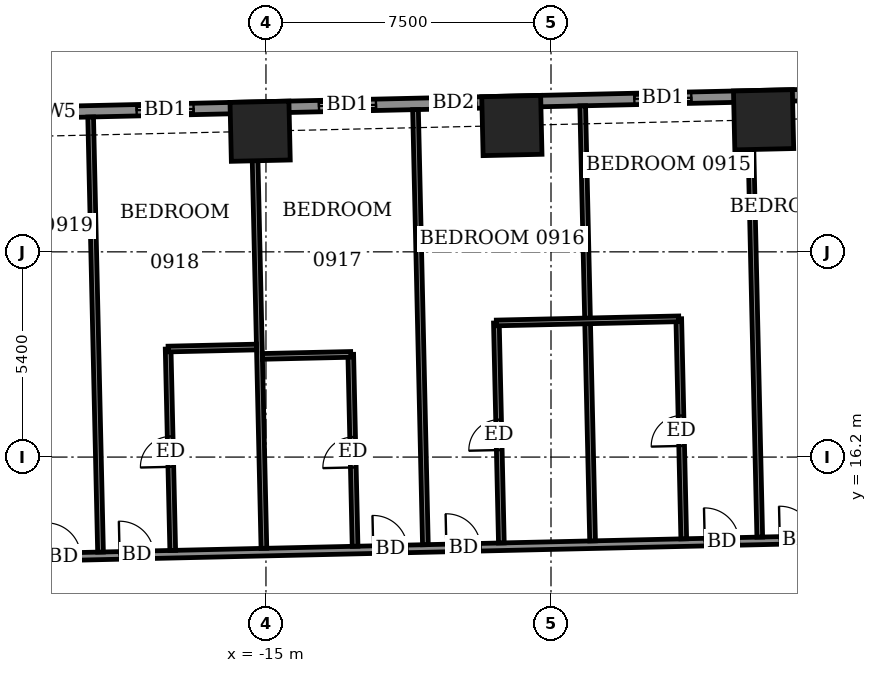
"""IFC4 building model, lengths in metres.
Left out: names, types, materials, properties, quantities, classifications, styles, units other than length and angle.
Written with IfcOpenShell. Run it as: python <this file> out.ifc"""

import sys

from ifc_helpers import new_model, si_unit, direction, frame, frame_2d, origin, origin_2d, place, context, subcontext, project, spatial, rectangle, extrude, element, fill, save


model = new_model("IFC4")
c1 = context("Model", 3, precision=1e-05, world=origin(), true_north=direction((0.0, 1.0)))
c2 = subcontext(c1, "Body", "Model", "MODEL_VIEW")
j1 = project(units=[si_unit("LENGTHUNIT", "METRE"), si_unit("PLANEANGLEUNIT", "RADIAN")], contexts=[c1])
p1 = place(None, origin())
s1 = spatial("IfcSite", under=j1, at=p1, CompositionType="ELEMENT")
p2 = place(p1, origin())
s2 = spatial("IfcBuilding", under=s1, at=p2, CompositionType="ELEMENT")
p3 = place(p2, frame((0.0, 0.0, 41.3)))
s3 = spatial("IfcBuildingStorey", under=s2, at=p3, CompositionType="ELEMENT", Elevation=41.3)
for number, where, z_axis, x_axis in (
    (1, (-1.906, 25.075, -0.55), (0.0, 0.0, 1.0), (-1.0, -0.023, 0.0)),
    (2, (-8.529, 24.924, -0.55), (0.0, 0.0, 1.0), (-1.0, -0.023, 0.0)),
    (3, (-15.154, 24.774, -0.55), (0.0, 0.0, 1.0), (-1.0, -0.023, 0.0)),
):
    element("IfcColumn", number, at=place(p3, frame(where, z_axis=z_axis, x_axis=x_axis)), inside=s3, PredefinedType="COLUMN", context=c2, shape_type="SweptSolid", body=[
        extrude(rectangle(XDim=1.55, YDim=1.55, at=origin_2d()), origin(), (0.0, 0.0, 1.0), 3.6),
    ])
p4 = place(p3, frame((24.423, 26.298, 0.0), z_axis=(0.0, 0.0, 1.0), x_axis=(-0.999742433108, -0.022695097355, 0.0)))
e4 = element("IfcWall", 4, at=p4, inside=s3, PredefinedType="SOLIDWALL", context=c2, shape_type="SweptSolid", body=[
    extrude(rectangle(XDim=52.701, YDim=0.3, at=frame_2d((26.35, 0.0))), origin(), (0.0, 0.0, 1.0), 3.05),
])
p5 = place(p4, frame((2.357, 0.0, 0.0)))
e5 = element("IfcOpeningElement", 5, at=p5, cuts=e4, PredefinedType="OPENING", context=c2, shape_type="SweptSolid", body=[
    extrude(rectangle(XDim=1.5, YDim=2.4, at=frame_2d((0.75, 1.2))), frame((0.0, 0.16, 0.0), z_axis=(0.0, -1.0, 0.0), x_axis=(1.0, 0.0, 0.0)), (0.0, 0.0, 1.0), 0.32),
])
p6 = place(p4, frame((7.475, 0.0, 0.0)))
e6 = element("IfcOpeningElement", 6, at=p6, cuts=e4, PredefinedType="OPENING", context=c2, shape_type="SweptSolid", body=[
    extrude(rectangle(XDim=1.5, YDim=2.4, at=frame_2d((0.75, 1.2))), frame((0.0, 0.16, 0.0), z_axis=(0.0, -1.0, 0.0), x_axis=(1.0, 0.0, 0.0)), (0.0, 0.0, 1.0), 0.32),
])
p7 = place(p4, frame((10.262, 0.0, 0.0)))
e7 = element("IfcOpeningElement", 7, at=p7, cuts=e4, PredefinedType="OPENING", context=c2, shape_type="SweptSolid", body=[
    extrude(rectangle(XDim=1.5, YDim=2.4, at=frame_2d((0.75, 1.2))), frame((0.0, 0.16, 0.0), z_axis=(0.0, -1.0, 0.0), x_axis=(1.0, 0.0, 0.0)), (0.0, 0.0, 1.0), 0.32),
])
p8 = place(p4, frame((15.1, 0.0, 0.0)))
e8 = element("IfcOpeningElement", 8, at=p8, cuts=e4, PredefinedType="OPENING", context=c2, shape_type="SweptSolid", body=[
    extrude(rectangle(XDim=1.5, YDim=2.4, at=frame_2d((0.75, 1.2))), frame((0.0, 0.16, 0.0), z_axis=(0.0, -1.0, 0.0), x_axis=(1.0, 0.0, 0.0)), (0.0, 0.0, 1.0), 0.32),
])
p9 = place(p4, frame((20.7, 0.0, 0.0)))
e9 = element("IfcOpeningElement", 9, at=p9, cuts=e4, PredefinedType="OPENING", context=c2, shape_type="SweptSolid", body=[
    extrude(rectangle(XDim=1.2, YDim=2.4, at=frame_2d((0.6, 1.2))), frame((0.0, 0.16, 0.0), z_axis=(0.0, -1.0, 0.0), x_axis=(1.0, 0.0, 0.0)), (0.0, 0.0, 1.0), 0.32),
])
p10 = place(p4, frame((23.337, 0.0, 0.0)))
e10 = element("IfcOpeningElement", 10, at=p10, cuts=e4, PredefinedType="OPENING", context=c2, shape_type="SweptSolid", body=[
    extrude(rectangle(XDim=1.5, YDim=2.4, at=frame_2d((0.75, 1.2))), frame((0.0, 0.16, 0.0), z_axis=(0.0, -1.0, 0.0), x_axis=(1.0, 0.0, 0.0)), (0.0, 0.0, 1.0), 0.32),
])
p11 = place(p4, frame((28.238, 0.0, 0.0)))
e11 = element("IfcOpeningElement", 11, at=p11, cuts=e4, PredefinedType="OPENING", context=c2, shape_type="SweptSolid", body=[
    extrude(rectangle(XDim=1.5, YDim=2.4, at=frame_2d((0.75, 1.2))), frame((0.0, 0.16, 0.0), z_axis=(0.0, -1.0, 0.0), x_axis=(1.0, 0.0, 0.0)), (0.0, 0.0, 1.0), 0.32),
])
p12 = place(p4, frame((33.9, 0.0, 0.0)))
e12 = element("IfcOpeningElement", 12, at=p12, cuts=e4, PredefinedType="OPENING", context=c2, shape_type="SweptSolid", body=[
    extrude(rectangle(XDim=1.2, YDim=2.4, at=frame_2d((0.6, 1.2))), frame((0.0, 0.16, 0.0), z_axis=(0.0, -1.0, 0.0), x_axis=(1.0, 0.0, 0.0)), (0.0, 0.0, 1.0), 0.32),
])
p13 = place(p4, frame((36.538, 0.0, 0.0)))
e13 = element("IfcOpeningElement", 13, at=p13, cuts=e4, PredefinedType="OPENING", context=c2, shape_type="SweptSolid", body=[
    extrude(rectangle(XDim=1.5, YDim=2.4, at=frame_2d((0.75, 1.2))), frame((0.0, 0.16, 0.0), z_axis=(0.0, -1.0, 0.0), x_axis=(1.0, 0.0, 0.0)), (0.0, 0.0, 1.0), 0.32),
])
p14 = place(p4, frame((41.338, 0.0, 0.0)))
e14 = element("IfcOpeningElement", 14, at=p14, cuts=e4, PredefinedType="OPENING", context=c2, shape_type="SweptSolid", body=[
    extrude(rectangle(XDim=1.5, YDim=2.4, at=frame_2d((0.75, 1.2))), frame((0.0, 0.16, 0.0), z_axis=(0.0, -1.0, 0.0), x_axis=(1.0, 0.0, 0.0)), (0.0, 0.0, 1.0), 0.32),
])
p15 = place(p4, frame((44.4, 0.0, 0.9)))
e15 = element("IfcOpeningElement", 15, at=p15, cuts=e4, PredefinedType="OPENING", context=c2, shape_type="SweptSolid", body=[
    extrude(rectangle(XDim=0.9, YDim=1.5, at=frame_2d((0.45, 0.75))), frame((0.0, 0.16, 0.0), z_axis=(0.0, -1.0, 0.0), x_axis=(1.0, 0.0, 0.0)), (0.0, 0.0, 1.0), 0.32),
])
p16 = place(p4, frame((48.764, 0.0, 0.9)))
e16 = element("IfcOpeningElement", 16, at=p16, cuts=e4, PredefinedType="OPENING", context=c2, shape_type="SweptSolid", body=[
    extrude(rectangle(XDim=2.4, YDim=1.5, at=frame_2d((1.2, 0.75))), frame((0.0, 0.16, 0.0), z_axis=(0.0, -1.0, 0.0), x_axis=(1.0, 0.0, 0.0)), (0.0, 0.0, 1.0), 0.32),
])
p17 = place(p3, frame((-22.248, 26.688, 0.0), z_axis=(0.0, 0.0, 1.0), x_axis=(0.999743178102, 0.022662255828, 0.0)))
e17 = element("IfcWall", 17, at=p17, inside=s3, PredefinedType="USERDEFINED", context=c2, shape_type="SweptSolid", body=[
    extrude(rectangle(XDim=6.0, YDim=0.55, at=frame_2d((3.0, 0.0))), origin(), (0.0, 0.0, 1.0), 0.8),
])
p18 = place(p3, frame((-31.347, 13.329, 0.0), z_axis=(0.0, 0.0, 1.0), x_axis=(0.999742613079, 0.022687168058, 0.0)))
e18 = element("IfcWall", 18, at=p18, inside=s3, PredefinedType="PARTITIONING", context=c2, shape_type="SweptSolid", body=[
    extrude(rectangle(XDim=58.799, YDim=0.2, at=frame_2d((29.399, 0.0))), origin(), (0.0, 0.0, 1.0), 3.05),
])
p19 = place(p18, frame((56.45, 0.0, 0.0)))
e19 = element("IfcOpeningElement", 19, at=p19, cuts=e18, PredefinedType="OPENING", context=c2, shape_type="SweptSolid", body=[
    extrude(rectangle(XDim=1.0, YDim=2.1, at=frame_2d((0.5, 1.05))), frame((0.0, 0.11, 0.0), z_axis=(0.0, -1.0, 0.0), x_axis=(1.0, 0.0, 0.0)), (0.0, 0.0, 1.0), 0.22),
])
p20 = place(p18, frame((51.85, 0.0, 0.0)))
e20 = element("IfcOpeningElement", 20, at=p20, cuts=e18, PredefinedType="OPENING", context=c2, shape_type="SweptSolid", body=[
    extrude(rectangle(XDim=0.9, YDim=2.1, at=frame_2d((0.45, 1.05))), frame((0.0, 0.11, 0.0), z_axis=(0.0, -1.0, 0.0), x_axis=(1.0, 0.0, 0.0)), (0.0, 0.0, 1.0), 0.22),
])
p21 = place(p18, frame((47.1, 0.0, 0.0)))
e21 = element("IfcOpeningElement", 21, at=p21, cuts=e18, PredefinedType="OPENING", context=c2, shape_type="SweptSolid", body=[
    extrude(rectangle(XDim=0.9, YDim=2.1, at=frame_2d((0.45, 1.05))), frame((0.0, 0.11, 0.0), z_axis=(0.0, -1.0, 0.0), x_axis=(1.0, 0.0, 0.0)), (0.0, 0.0, 1.0), 0.22),
])
p22 = place(p18, frame((45.225, 0.0, 0.0)))
e22 = element("IfcOpeningElement", 22, at=p22, cuts=e18, PredefinedType="OPENING", context=c2, shape_type="SweptSolid", body=[
    extrude(rectangle(XDim=0.9, YDim=2.1, at=frame_2d((0.45, 1.05))), frame((0.0, 0.11, 0.0), z_axis=(0.0, -1.0, 0.0), x_axis=(1.0, 0.0, 0.0)), (0.0, 0.0, 1.0), 0.22),
])
p23 = place(p18, frame((38.55, 0.0, 0.0)))
e23 = element("IfcOpeningElement", 23, at=p23, cuts=e18, PredefinedType="OPENING", context=c2, shape_type="SweptSolid", body=[
    extrude(rectangle(XDim=0.9, YDim=2.1, at=frame_2d((0.45, 1.05))), frame((0.0, 0.11, 0.0), z_axis=(0.0, -1.0, 0.0), x_axis=(1.0, 0.0, 0.0)), (0.0, 0.0, 1.0), 0.22),
])
p24 = place(p18, frame((36.625, 0.0, 0.0)))
e24 = element("IfcOpeningElement", 24, at=p24, cuts=e18, PredefinedType="OPENING", context=c2, shape_type="SweptSolid", body=[
    extrude(rectangle(XDim=0.9, YDim=2.1, at=frame_2d((0.45, 1.05))), frame((0.0, 0.11, 0.0), z_axis=(0.0, -1.0, 0.0), x_axis=(1.0, 0.0, 0.0)), (0.0, 0.0, 1.0), 0.22),
])
p25 = place(p18, frame((29.875, 0.0, 0.0)))
e25 = element("IfcOpeningElement", 25, at=p25, cuts=e18, PredefinedType="OPENING", context=c2, shape_type="SweptSolid", body=[
    extrude(rectangle(XDim=0.9, YDim=2.1, at=frame_2d((0.45, 1.05))), frame((0.0, 0.11, 0.0), z_axis=(0.0, -1.0, 0.0), x_axis=(1.0, 0.0, 0.0)), (0.0, 0.0, 1.0), 0.22),
])
p26 = place(p18, frame((27.9, 0.0, 0.0)))
e26 = element("IfcOpeningElement", 26, at=p26, cuts=e18, PredefinedType="OPENING", context=c2, shape_type="SweptSolid", body=[
    extrude(rectangle(XDim=0.9, YDim=2.1, at=frame_2d((0.45, 1.05))), frame((0.0, 0.11, 0.0), z_axis=(0.0, -1.0, 0.0), x_axis=(1.0, 0.0, 0.0)), (0.0, 0.0, 1.0), 0.22),
])
p27 = place(p18, frame((21.1, 0.0, 0.0)))
e27 = element("IfcOpeningElement", 27, at=p27, cuts=e18, PredefinedType="OPENING", context=c2, shape_type="SweptSolid", body=[
    extrude(rectangle(XDim=0.9, YDim=2.1, at=frame_2d((0.45, 1.05))), frame((0.0, 0.11, 0.0), z_axis=(0.0, -1.0, 0.0), x_axis=(1.0, 0.0, 0.0)), (0.0, 0.0, 1.0), 0.22),
])
p28 = place(p18, frame((19.175, 0.0, 0.0)))
e28 = element("IfcOpeningElement", 28, at=p28, cuts=e18, PredefinedType="OPENING", context=c2, shape_type="SweptSolid", body=[
    extrude(rectangle(XDim=0.9, YDim=2.1, at=frame_2d((0.45, 1.05))), frame((0.0, 0.11, 0.0), z_axis=(0.0, -1.0, 0.0), x_axis=(1.0, 0.0, 0.0)), (0.0, 0.0, 1.0), 0.22),
])
p29 = place(p18, frame((12.5, 0.0, 0.0)))
e29 = element("IfcOpeningElement", 29, at=p29, cuts=e18, PredefinedType="OPENING", context=c2, shape_type="SweptSolid", body=[
    extrude(rectangle(XDim=0.9, YDim=2.1, at=frame_2d((0.45, 1.05))), frame((0.0, 0.11, 0.0), z_axis=(0.0, -1.0, 0.0), x_axis=(1.0, 0.0, 0.0)), (0.0, 0.0, 1.0), 0.22),
])
p30 = place(p18, frame((10.575, 0.0, 0.0)))
e30 = element("IfcOpeningElement", 30, at=p30, cuts=e18, PredefinedType="OPENING", context=c2, shape_type="SweptSolid", body=[
    extrude(rectangle(XDim=0.9, YDim=2.1, at=frame_2d((0.45, 1.05))), frame((0.0, 0.11, 0.0), z_axis=(0.0, -1.0, 0.0), x_axis=(1.0, 0.0, 0.0)), (0.0, 0.0, 1.0), 0.22),
])
p31 = place(p18, frame((1.425, 0.0, 0.0)))
e31 = element("IfcOpeningElement", 31, at=p31, cuts=e18, PredefinedType="OPENING", context=c2, shape_type="SweptSolid", body=[
    extrude(rectangle(XDim=1.0, YDim=2.1, at=frame_2d((0.5, 1.05))), frame((0.0, 0.11, 0.0), z_axis=(0.0, -1.0, 0.0), x_axis=(1.0, 0.0, 0.0)), (0.0, 0.0, 1.0), 0.22),
])
p32 = place(p18, frame((6.0, 0.0, 0.0)))
e32 = element("IfcOpeningElement", 32, at=p32, cuts=e18, PredefinedType="OPENING", context=c2, shape_type="SweptSolid", body=[
    extrude(rectangle(XDim=0.9, YDim=2.1, at=frame_2d((0.45, 1.05))), frame((0.0, 0.11, 0.0), z_axis=(0.0, -1.0, 0.0), x_axis=(1.0, 0.0, 0.0)), (0.0, 0.0, 1.0), 0.22),
])
p33 = place(p3, frame((-19.353, 13.701, 0.0), z_axis=(0.0, 0.0, 1.0), x_axis=(-0.022708327922, 0.999742132674, 0.0)))
e33 = element("IfcWall", 33, at=p33, inside=s3, PredefinedType="PARTITIONING", context=c2, shape_type="SweptSolid", body=[
    extrude(rectangle(XDim=11.45, YDim=0.15, at=frame_2d((5.725, 0.0))), origin(), (0.0, 0.0, 1.0), 2.55),
])
p34 = place(p3, frame((-17.453, 13.744, 0.0), z_axis=(0.0, 0.0, 1.0), x_axis=(-0.022845913063, 0.999738998067, 0.0)))
e34 = element("IfcWall", 34, at=p34, inside=s3, PredefinedType="PARTITIONING", context=c2, shape_type="SweptSolid", body=[
    extrude(rectangle(XDim=5.301, YDim=0.15, at=frame_2d((2.65, 0.0))), origin(), (0.0, 0.0, 1.0), 3.05),
])
p35 = place(p34, frame((2.2, 0.0, 0.0)))
e35 = element("IfcOpeningElement", 35, at=p35, cuts=e34, PredefinedType="OPENING", context=c2, shape_type="SweptSolid", body=[
    extrude(rectangle(XDim=0.8, YDim=2.1, at=frame_2d((0.4, 1.05))), frame((0.0, 0.085, 0.0), z_axis=(0.0, -1.0, 0.0), x_axis=(1.0, 0.0, 0.0)), (0.0, 0.0, 1.0), 0.17),
])
p36 = place(p3, frame((-15.054, 13.799, 0.0), z_axis=(0.0, 0.0, 1.0), x_axis=(-0.022708327922, 0.999742132674, 0.0)))
e36 = element("IfcWall", 36, at=p36, inside=s3, PredefinedType="PARTITIONING", context=c2, shape_type="SweptSolid", body=[
    extrude(rectangle(XDim=11.45, YDim=0.15, at=frame_2d((5.725, 0.0))), origin(), (0.0, 0.0, 1.0), 3.05),
])
p37 = place(p3, frame((-12.655, 13.853, 0.0), z_axis=(0.0, 0.0, 1.0), x_axis=(-0.02257535817, 0.999745144126, 0.0)))
e37 = element("IfcWall", 37, at=p37, inside=s3, PredefinedType="PARTITIONING", context=c2, shape_type="SweptSolid", body=[
    extrude(rectangle(XDim=5.05, YDim=0.15, at=frame_2d((2.525, 0.0))), origin(), (0.0, 0.0, 1.0), 3.05),
])
p38 = place(p37, frame((2.075, 0.0, 0.0)))
e38 = element("IfcOpeningElement", 38, at=p38, cuts=e37, PredefinedType="OPENING", context=c2, shape_type="SweptSolid", body=[
    extrude(rectangle(XDim=0.8, YDim=2.1, at=frame_2d((0.4, 1.05))), frame((0.0, 0.085, 0.0), z_axis=(0.0, -1.0, 0.0), x_axis=(1.0, 0.0, 0.0)), (0.0, 0.0, 1.0), 0.17),
])
p39 = place(p3, frame((-10.805, 13.895, 0.0), z_axis=(0.0, 0.0, 1.0), x_axis=(-0.022708327922, 0.999742132674, 0.0)))
e39 = element("IfcWall", 39, at=p39, inside=s3, PredefinedType="PARTITIONING", context=c2, shape_type="SweptSolid", body=[
    extrude(rectangle(XDim=11.45, YDim=0.15, at=frame_2d((5.725, 0.0))), origin(), (0.0, 0.0, 1.0), 2.55),
])
p40 = place(p3, frame((-8.806, 13.941, 0.0), z_axis=(0.0, 0.0, 1.0), x_axis=(-0.022644773889, 0.999743574231, 0.0)))
e40 = element("IfcWall", 40, at=p40, inside=s3, PredefinedType="PARTITIONING", context=c2, shape_type="SweptSolid", body=[
    extrude(rectangle(XDim=5.79, YDim=0.15, at=frame_2d((2.895, 0.0))), origin(), (0.0, 0.0, 1.0), 3.05),
])
p41 = place(p40, frame((2.445, 0.0, 0.0)))
e41 = element("IfcOpeningElement", 41, at=p41, cuts=e40, PredefinedType="OPENING", context=c2, shape_type="SweptSolid", body=[
    extrude(rectangle(XDim=0.8, YDim=2.1, at=frame_2d((0.4, 1.05))), frame((0.0, 0.085, 0.0), z_axis=(0.0, -1.0, 0.0), x_axis=(1.0, 0.0, 0.0)), (0.0, 0.0, 1.0), 0.17),
])
p42 = place(p3, frame((-6.406, 13.995, 0.0), z_axis=(0.0, 0.0, 1.0), x_axis=(-0.022708812003, 0.999742121678, 0.0)))
e42 = element("IfcWall", 42, at=p42, inside=s3, PredefinedType="PARTITIONING", context=c2, shape_type="SweptSolid", body=[
    extrude(rectangle(XDim=11.45, YDim=0.15, at=frame_2d((5.725, 0.0))), origin(), (0.0, 0.0, 1.0), 2.55),
])
p43 = place(p3, frame((-4.007, 14.049, 0.0), z_axis=(0.0, 0.0, 1.0), x_axis=(-0.02259976811, 0.999744592624, 0.0)))
e43 = element("IfcWall", 43, at=p43, inside=s3, PredefinedType="PARTITIONING", context=c2, shape_type="SweptSolid", body=[
    extrude(rectangle(XDim=5.79, YDim=0.15, at=frame_2d((2.895, 0.0))), origin(), (0.0, 0.0, 1.0), 3.05),
])
p44 = place(p43, frame((2.445, 0.0, 0.0)))
e44 = element("IfcOpeningElement", 44, at=p44, cuts=e43, PredefinedType="OPENING", context=c2, shape_type="SweptSolid", body=[
    extrude(rectangle(XDim=0.8, YDim=2.1, at=frame_2d((0.4, 1.05))), frame((0.0, 0.085, 0.0), z_axis=(0.0, -1.0, 0.0), x_axis=(1.0, 0.0, 0.0)), (0.0, 0.0, 1.0), 0.17),
])
p45 = place(p3, frame((-2.007, 14.095, 0.0), z_axis=(0.0, 0.0, 1.0), x_axis=(-0.022708327922, 0.999742132674, 0.0)))
e45 = element("IfcWall", 45, at=p45, inside=s3, PredefinedType="PARTITIONING", context=c2, shape_type="SweptSolid", body=[
    extrude(rectangle(XDim=11.45, YDim=0.15, at=frame_2d((5.725, 0.0))), origin(), (0.0, 0.0, 1.0), 3.05),
])
for number, where, z_axis, x_axis in (
    (46, (-15.094, 18.849, 0.0), (0.0, 0.0, 1.0), (1.0, 0.023, 0.0)),
    (47, (-17.574, 19.043, 0.0), (0.0, 0.0, 1.0), (1.0, 0.023, 0.0)),
):
    element("IfcWall", number, at=place(p3, frame(where, z_axis=z_axis, x_axis=x_axis)), inside=s3, PredefinedType="PARTITIONING", context=c2, shape_type="SweptSolid", body=[
        extrude(rectangle(XDim=2.325, YDim=0.15, at=frame_2d((1.163, 0.0))), origin(), (0.0, 0.0, 1.0), 3.05),
    ])
p46 = place(p3, frame((-8.937, 19.729, 0.0), z_axis=(0.0, 0.0, 1.0), x_axis=(0.999742701292, 0.022683280499, 0.0)))
e48 = element("IfcWall", 48, at=p46, inside=s3, PredefinedType="PARTITIONING", context=c2, shape_type="SweptSolid", body=[
    extrude(rectangle(XDim=4.8, YDim=0.15, at=frame_2d((2.4, 0.0))), origin(), (0.0, 0.0, 1.0), 3.05),
])
p47 = place(p11, origin())
e49 = element("IfcDoor", 49, at=p47, inside=s3, OperationType="SLIDING_TO_LEFT", PredefinedType="DOOR", context=c2, shape_type="SweptSolid", body=[
    extrude(rectangle(XDim=1.5, YDim=2.4, at=frame_2d((0.75, 1.2))), frame((0.0, 0.025, 0.0), z_axis=(0.0, -1.0, 0.0), x_axis=(1.0, 0.0, 0.0)), (0.0, 0.0, 1.0), 0.05),
])
fill(e11, e49)
p48 = place(p12, origin())
e50 = element("IfcDoor", 50, at=p48, inside=s3, OperationType="SLIDING_TO_LEFT", PredefinedType="DOOR", context=c2, shape_type="SweptSolid", body=[
    extrude(rectangle(XDim=1.2, YDim=2.4, at=frame_2d((0.6, 1.2))), frame((0.0, 0.025, 0.0), z_axis=(0.0, -1.0, 0.0), x_axis=(1.0, 0.0, 0.0)), (0.0, 0.0, 1.0), 0.05),
])
fill(e12, e50)
p49 = place(p13, origin())
e51 = element("IfcDoor", 51, at=p49, inside=s3, OperationType="SLIDING_TO_LEFT", PredefinedType="DOOR", context=c2, shape_type="SweptSolid", body=[
    extrude(rectangle(XDim=1.5, YDim=2.4, at=frame_2d((0.75, 1.2))), frame((0.0, 0.025, 0.0), z_axis=(0.0, -1.0, 0.0), x_axis=(1.0, 0.0, 0.0)), (0.0, 0.0, 1.0), 0.05),
])
fill(e13, e51)
p50 = place(p14, origin())
e52 = element("IfcDoor", 52, at=p50, inside=s3, OperationType="SLIDING_TO_LEFT", PredefinedType="DOOR", context=c2, shape_type="SweptSolid", body=[
    extrude(rectangle(XDim=1.5, YDim=2.4, at=frame_2d((0.75, 1.2))), frame((0.0, 0.025, 0.0), z_axis=(0.0, -1.0, 0.0), x_axis=(1.0, 0.0, 0.0)), (0.0, 0.0, 1.0), 0.05),
])
fill(e14, e52)
p51 = place(p15, origin())
e53 = element("IfcWindow", 53, at=p51, inside=s3, PartitioningType="SINGLE_PANEL", PredefinedType="WINDOW", context=c2, shape_type="SweptSolid", body=[
    extrude(rectangle(XDim=0.9, YDim=1.5, at=frame_2d((0.45, 0.75))), frame((0.0, 0.03, 0.0), z_axis=(0.0, -1.0, 0.0), x_axis=(1.0, 0.0, 0.0)), (0.0, 0.0, 1.0), 0.06),
])
fill(e15, e53)
p52 = place(p25, origin())
e54 = element("IfcDoor", 54, at=p52, inside=s3, OperationType="SINGLE_SWING_RIGHT", PredefinedType="DOOR", context=c2, shape_type="SweptSolid", body=[
    extrude(rectangle(XDim=0.9, YDim=2.1, at=frame_2d((0.45, 1.05))), frame((0.0, 0.025, 0.0), z_axis=(0.0, -1.0, 0.0), x_axis=(1.0, 0.0, 0.0)), (0.0, 0.0, 1.0), 0.05),
])
fill(e25, e54)
p53 = place(p26, origin())
e55 = element("IfcDoor", 55, at=p53, inside=s3, OperationType="SINGLE_SWING_LEFT", PredefinedType="DOOR", context=c2, shape_type="SweptSolid", body=[
    extrude(rectangle(XDim=0.9, YDim=2.1, at=frame_2d((0.45, 1.05))), frame((0.0, 0.025, 0.0), z_axis=(0.0, -1.0, 0.0), x_axis=(1.0, 0.0, 0.0)), (0.0, 0.0, 1.0), 0.05),
])
fill(e26, e55)
p54 = place(p44, origin())
e56 = element("IfcDoor", 56, at=p54, inside=s3, OperationType="SINGLE_SWING_LEFT", PredefinedType="DOOR", context=c2, shape_type="SweptSolid", body=[
    extrude(rectangle(XDim=0.8, YDim=2.1, at=frame_2d((0.4, 1.05))), frame((0.0, 0.025, 0.0), z_axis=(0.0, -1.0, 0.0), x_axis=(1.0, 0.0, 0.0)), (0.0, 0.0, 1.0), 0.05),
])
fill(e44, e56)
p55 = place(p27, origin())
e57 = element("IfcDoor", 57, at=p55, inside=s3, OperationType="SINGLE_SWING_RIGHT", PredefinedType="DOOR", context=c2, shape_type="SweptSolid", body=[
    extrude(rectangle(XDim=0.9, YDim=2.1, at=frame_2d((0.45, 1.05))), frame((0.0, 0.025, 0.0), z_axis=(0.0, -1.0, 0.0), x_axis=(1.0, 0.0, 0.0)), (0.0, 0.0, 1.0), 0.05),
])
fill(e27, e57)
p56 = place(p41, origin())
e58 = element("IfcDoor", 58, at=p56, inside=s3, OperationType="SINGLE_SWING_RIGHT", PredefinedType="DOOR", context=c2, shape_type="SweptSolid", body=[
    extrude(rectangle(XDim=0.8, YDim=2.1, at=frame_2d((0.4, 1.05))), frame((0.0, 0.025, 0.0), z_axis=(0.0, -1.0, 0.0), x_axis=(1.0, 0.0, 0.0)), (0.0, 0.0, 1.0), 0.05),
])
fill(e41, e58)
p57 = place(p28, origin())
e59 = element("IfcDoor", 59, at=p57, inside=s3, OperationType="SINGLE_SWING_LEFT", PredefinedType="DOOR", context=c2, shape_type="SweptSolid", body=[
    extrude(rectangle(XDim=0.9, YDim=2.1, at=frame_2d((0.45, 1.05))), frame((0.0, 0.025, 0.0), z_axis=(0.0, -1.0, 0.0), x_axis=(1.0, 0.0, 0.0)), (0.0, 0.0, 1.0), 0.05),
])
fill(e28, e59)
p58 = place(p38, origin())
e60 = element("IfcDoor", 60, at=p58, inside=s3, OperationType="SINGLE_SWING_LEFT", PredefinedType="DOOR", context=c2, shape_type="SweptSolid", body=[
    extrude(rectangle(XDim=0.8, YDim=2.1, at=frame_2d((0.4, 1.05))), frame((0.0, 0.025, 0.0), z_axis=(0.0, -1.0, 0.0), x_axis=(1.0, 0.0, 0.0)), (0.0, 0.0, 1.0), 0.05),
])
fill(e38, e60)
p59 = place(p29, origin())
e61 = element("IfcDoor", 61, at=p59, inside=s3, OperationType="SINGLE_SWING_RIGHT", PredefinedType="DOOR", context=c2, shape_type="SweptSolid", body=[
    extrude(rectangle(XDim=0.9, YDim=2.1, at=frame_2d((0.45, 1.05))), frame((0.0, 0.025, 0.0), z_axis=(0.0, -1.0, 0.0), x_axis=(1.0, 0.0, 0.0)), (0.0, 0.0, 1.0), 0.05),
])
fill(e29, e61)
p60 = place(p35, origin())
e62 = element("IfcDoor", 62, at=p60, inside=s3, OperationType="SINGLE_SWING_RIGHT", PredefinedType="DOOR", context=c2, shape_type="SweptSolid", body=[
    extrude(rectangle(XDim=0.8, YDim=2.1, at=frame_2d((0.4, 1.05))), frame((0.0, 0.025, 0.0), z_axis=(0.0, -1.0, 0.0), x_axis=(1.0, 0.0, 0.0)), (0.0, 0.0, 1.0), 0.05),
])
fill(e35, e62)
p61 = place(p30, origin())
e63 = element("IfcDoor", 63, at=p61, inside=s3, OperationType="SINGLE_SWING_LEFT", PredefinedType="DOOR", context=c2, shape_type="SweptSolid", body=[
    extrude(rectangle(XDim=0.9, YDim=2.1, at=frame_2d((0.45, 1.05))), frame((0.0, 0.025, 0.0), z_axis=(0.0, -1.0, 0.0), x_axis=(1.0, 0.0, 0.0)), (0.0, 0.0, 1.0), 0.05),
])
fill(e30, e63)
save(model, sys.argv[1])
